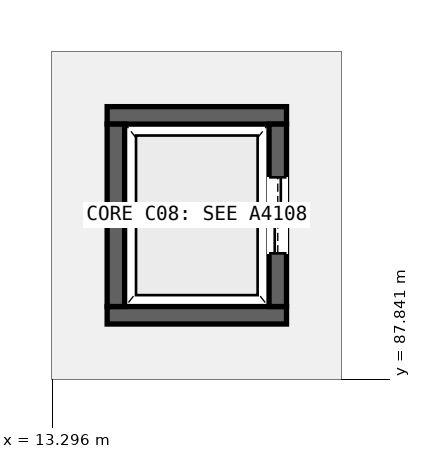
"""IFC4 building model, lengths in metres.
Left out: names, types, materials, properties, quantities, classifications, styles, units other than length and angle.
Written with IfcOpenShell. Run it as: python <this file> out.ifc"""

import sys

from ifc_helpers import new_model, si_unit, direction, frame, frame_2d, origin, place, context, subcontext, project, spatial, rectangle, extrude, element, fill, save


model = new_model("IFC4")
c1 = context("Model", 3, precision=1e-05, world=origin(), true_north=direction((0.0, 1.0)))
c2 = subcontext(c1, "Body", "Model", "MODEL_VIEW")
j1 = project(units=[si_unit("LENGTHUNIT", "METRE"), si_unit("PLANEANGLEUNIT", "RADIAN")], contexts=[c1])
p1 = place(None, origin())
s1 = spatial("IfcSite", under=j1, at=p1, CompositionType="ELEMENT")
p2 = place(p1, origin())
s2 = spatial("IfcBuilding", under=s1, at=p2, CompositionType="ELEMENT")
p3 = place(p2, frame((0.0, 0.0, 20.4)))
s3 = spatial("IfcBuildingStorey", under=s2, at=p3, CompositionType="ELEMENT", Elevation=20.4)
for number, where, z_axis, x_axis in (
    (1, (14.02, 88.685, 0.0), (0.0, 0.0, 1.0), (1.0, 0.0, 0.0)),
    (2, (14.02, 91.315, 0.0), (0.0, 0.0, 1.0), (1.0, 0.0, 0.0)),
):
    element("IfcWall", number, at=place(p3, frame(where, z_axis=z_axis, x_axis=x_axis)), inside=s3, PredefinedType="SHEAR", context=c2, shape_type="SweptSolid", body=[
        extrude(rectangle(XDim=2.36, YDim=0.23, at=frame_2d((1.18, 0.0))), origin(), (0.0, 0.0, 1.0), 5.18),
    ])
p4 = place(p3, frame((14.135, 88.8, 0.0), z_axis=(0.0, 0.0, 1.0), x_axis=(0.0, 1.0, 0.0)))
e3 = element("IfcWall", 3, at=p4, inside=s3, PredefinedType="SHEAR", context=c2, shape_type="SweptSolid", body=[
    extrude(rectangle(XDim=2.4, YDim=0.23, at=frame_2d((1.2, 0.0))), origin(), (0.0, 0.0, 1.0), 5.18),
])
p5 = place(p3, frame((16.265, 88.8, 0.0), z_axis=(0.0, 0.0, 1.0), x_axis=(0.0, 1.0, 0.0)))
e4 = element("IfcWall", 4, at=p5, inside=s3, PredefinedType="SHEAR", context=c2, shape_type="SweptSolid", body=[
    extrude(rectangle(XDim=2.4, YDim=0.23, at=frame_2d((1.2, 0.0))), origin(), (0.0, 0.0, 1.0), 5.18),
])
p6 = place(p5, frame((0.7, 0.0, 0.0)))
e5 = element("IfcOpeningElement", 5, at=p6, cuts=e4, PredefinedType="OPENING", context=c2, shape_type="SweptSolid", body=[
    extrude(rectangle(XDim=1.0, YDim=2.15, at=frame_2d((0.5, 1.075))), frame((0.0, 0.125, 0.0), z_axis=(0.0, -1.0, 0.0), x_axis=(1.0, 0.0, 0.0)), (0.0, 0.0, 1.0), 0.25),
])
p7 = place(p6, origin())
e6 = element("IfcDoor", 6, at=p7, inside=s3, OperationType="DOUBLE_DOOR_SLIDING", PredefinedType="DOOR", context=c2, shape_type="SweptSolid", body=[
    extrude(rectangle(XDim=1.0, YDim=2.15, at=frame_2d((0.5, 1.075))), frame((0.0, 0.025, 0.0), z_axis=(0.0, -1.0, 0.0), x_axis=(1.0, 0.0, 0.0)), (0.0, 0.0, 1.0), 0.05),
])
fill(e5, e6)
save(model, sys.argv[1])
